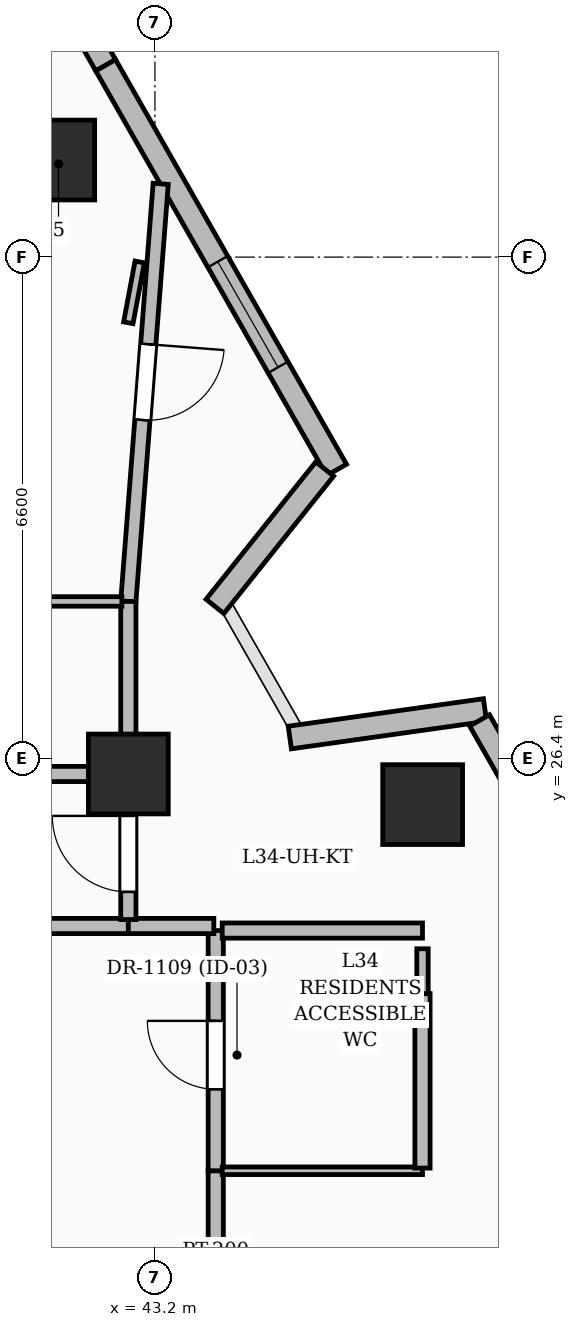
"""IFC4 building model, lengths in metres.
Left out: names, types, materials, properties, quantities, classifications, styles, units other than length and angle.
Written with IfcOpenShell. Run it as: python <this file> out.ifc"""

import sys

from ifc_helpers import new_model, si_unit, direction, frame, frame_2d, origin, origin_2d, place, context, subcontext, project, spatial, rectangle, extrude, element, fill, save


model = new_model("IFC4")
c1 = context("Model", 3, precision=1e-05, world=origin(), true_north=direction((0.0, 1.0)))
c2 = subcontext(c1, "Body", "Model", "MODEL_VIEW")
j1 = project(units=[si_unit("LENGTHUNIT", "METRE"), si_unit("PLANEANGLEUNIT", "RADIAN")], contexts=[c1])
p1 = place(None, origin())
s1 = spatial("IfcSite", under=j1, at=p1, CompositionType="ELEMENT")
p2 = place(p1, origin())
s2 = spatial("IfcBuilding", under=s1, at=p2, CompositionType="ELEMENT")
p3 = place(p2, frame((0.0, 0.0, 135.6)))
s3 = spatial("IfcBuildingStorey", under=s2, at=p3, CompositionType="ELEMENT", Elevation=135.6)
for number, where, z_axis, x_axis in (
    (1, (42.85, 26.2, 0.0), (0.0, 0.0, 1.0), (1.0, 0.0, 0.0)),
    (2, (46.722, 25.797, 0.0), (0.0, 0.0, 1.0), (1.0, 0.0, 0.0)),
    (3, (41.882, 34.277, 0.0), (0.0, 0.0, 1.0), (1.0, 0.0, 0.0)),
):
    element("IfcColumn", number, at=place(p3, frame(where, z_axis=z_axis, x_axis=x_axis)), inside=s3, PredefinedType="COLUMN", context=c2, shape_type="SweptSolid", body=[
        extrude(rectangle(XDim=1.05, YDim=1.05, at=origin_2d()), origin(), (0.0, 0.0, 1.0), 3.6),
    ])
p4 = place(p3, frame((39.799, 40.348, 0.0), z_axis=(0.0, 0.0, 1.0), x_axis=(0.495693940787, -0.868497275222, 0.0)))
e4 = element("IfcWall", 4, at=p4, inside=s3, PredefinedType="SOLIDWALL", context=c2, shape_type="SweptSolid", body=[
    extrude(rectangle(XDim=5.555, YDim=0.3, at=frame_2d((2.777, 0.0))), origin(), (0.0, 0.0, 1.0), 3.35),
])
p5 = place(p4, frame((2.175, 0.0, 0.6)))
e5 = element("IfcOpeningElement", 5, at=p5, cuts=e4, PredefinedType="OPENING", context=c2, shape_type="SweptSolid", body=[
    extrude(rectangle(XDim=1.8, YDim=2.1, at=frame_2d((0.9, 1.05))), frame((0.0, 0.16, 0.0), z_axis=(0.0, -1.0, 0.0), x_axis=(1.0, 0.0, 0.0)), (0.0, 0.0, 1.0), 0.32),
])
p6 = place(p3, frame((42.552, 35.524, 0.0), z_axis=(0.0, 0.0, 1.0), x_axis=(0.495688482465, -0.86850039053, 0.0)))
e6 = element("IfcWall", 6, at=p6, inside=s3, PredefinedType="SOLIDWALL", context=c2, shape_type="SweptSolid", body=[
    extrude(rectangle(XDim=6.129, YDim=0.3, at=frame_2d((3.065, 0.0))), origin(), (0.0, 0.0, 1.0), 3.35),
])
p7 = place(p6, frame((2.975, 0.0, 0.55)))
e7 = element("IfcOpeningElement", 7, at=p7, cuts=e6, PredefinedType="OPENING", context=c2, shape_type="SweptSolid", body=[
    extrude(rectangle(XDim=1.6, YDim=2.2, at=frame_2d((0.8, 1.1))), frame((0.0, 0.16, 0.0), z_axis=(0.0, -1.0, 0.0), x_axis=(1.0, 0.0, 0.0)), (0.0, 0.0, 1.0), 0.32),
])
p8 = place(p3, frame((45.434, 30.213, 0.0), z_axis=(0.0, 0.0, 1.0), x_axis=(-0.624064384905, -0.781372922165, 0.0)))
e8 = element("IfcWall", 8, at=p8, inside=s3, PredefinedType="SOLIDWALL", context=c2, shape_type="SweptSolid", body=[
    extrude(rectangle(XDim=2.314, YDim=0.3, at=frame_2d((1.157, 0.0))), origin(), (0.0, 0.0, 1.0), 2.575),
])
p9 = place(p3, frame((44.974, 26.679, 0.0), z_axis=(0.0, 0.0, 1.0), x_axis=(0.990207636063, 0.139602426493, 0.0)))
e9 = element("IfcWall", 9, at=p9, inside=s3, PredefinedType="SOLIDWALL", context=c2, shape_type="SweptSolid", body=[
    extrude(rectangle(XDim=2.594, YDim=0.3, at=frame_2d((1.297, 0.0))), origin(), (0.0, 0.0, 1.0), 2.575),
])
p10 = place(p3, frame((47.471, 26.905, 0.0), z_axis=(0.0, 0.0, 1.0), x_axis=(0.495678614701, -0.86850602239, 0.0)))
e10 = element("IfcWall", 10, at=p10, inside=s3, PredefinedType="SOLIDWALL", context=c2, shape_type="SweptSolid", body=[
    extrude(rectangle(XDim=6.055, YDim=0.3, at=frame_2d((3.028, 0.0))), origin(), (0.0, 0.0, 1.0), 3.35),
])
p11 = place(p10, frame((4.15, 0.0, 0.8)))
e11 = element("IfcOpeningElement", 11, at=p11, cuts=e10, PredefinedType="OPENING", context=c2, shape_type="SweptSolid", body=[
    extrude(rectangle(XDim=1.2, YDim=1.8, at=frame_2d((0.6, 0.9))), frame((0.0, 0.16, 0.0), z_axis=(0.0, -1.0, 0.0), x_axis=(1.0, 0.0, 0.0)), (0.0, 0.0, 1.0), 0.32),
])
p12 = place(p3, frame((44.0, 17.835, 0.0), z_axis=(0.0, 0.0, 1.0), x_axis=(0.0, 1.0, 0.0)))
e12 = element("IfcWall", 12, at=p12, inside=s3, PredefinedType="PARTITIONING", context=c2, shape_type="SweptSolid", body=[
    extrude(rectangle(XDim=3.145, YDim=0.2, at=frame_2d((1.573, 0.0))), origin(), (0.0, 0.0, 1.0), 3.35),
])
p13 = place(p3, frame((42.85, 24.2, 0.0), z_axis=(0.0, 0.0, 1.0), x_axis=(-1.0, 0.0, 0.0)))
e13 = element("IfcWall", 13, at=p13, inside=s3, PredefinedType="PARTITIONING", context=c2, shape_type="SweptSolid", body=[
    extrude(rectangle(XDim=1.4, YDim=0.2, at=frame_2d((0.7, 0.0))), origin(), (0.0, 0.0, 1.0), 3.35),
])
p14 = place(p3, frame((44.0, 20.98, 0.0), z_axis=(0.0, 0.0, 1.0), x_axis=(0.0, 1.0, 0.0)))
e14 = element("IfcWall", 14, at=p14, inside=s3, PredefinedType="PARTITIONING", context=c2, shape_type="SweptSolid", body=[
    extrude(rectangle(XDim=3.16, YDim=0.2, at=frame_2d((1.58, 0.0))), origin(), (0.0, 0.0, 1.0), 2.436),
])
p15 = place(p14, frame((1.072, 0.0, 0.0)))
e15 = element("IfcOpeningElement", 15, at=p15, cuts=e14, PredefinedType="OPENING", context=c2, shape_type="SweptSolid", body=[
    extrude(rectangle(XDim=0.9, YDim=2.1, at=frame_2d((0.45, 1.05))), frame((0.0, 0.11, 0.0), z_axis=(0.0, -1.0, 0.0), x_axis=(1.0, 0.0, 0.0)), (0.0, 0.0, 1.0), 0.22),
])
p16 = place(p3, frame((43.975, 24.2, 0.0), z_axis=(0.0, 0.0, 1.0), x_axis=(-1.0, 0.0, 0.0)))
e16 = element("IfcWall", 16, at=p16, inside=s3, PredefinedType="PARTITIONING", context=c2, shape_type="SweptSolid", body=[
    extrude(rectangle(XDim=1.125, YDim=0.2, at=frame_2d((0.562, 0.0))), origin(), (0.0, 0.0, 1.0), 2.436),
])
p17 = place(p3, frame((46.72, 20.98, 0.0), z_axis=(0.0, 0.0, 1.0), x_axis=(-1.0, 0.0, 0.0)))
e17 = element("IfcWall", 17, at=p17, inside=s3, PredefinedType="PARTITIONING", context=c2, shape_type="SweptSolid", body=[
    extrude(rectangle(XDim=2.635, YDim=0.1, at=frame_2d((1.317, 0.0))), origin(), (0.0, 0.0, 1.0), 2.372),
])
p18 = place(p3, frame((42.85, 24.285, 0.0), z_axis=(0.0, 0.0, 1.0), x_axis=(0.0, 1.0, 0.0)))
e18 = element("IfcWall", 18, at=p18, inside=s3, PredefinedType="PARTITIONING", context=c2, shape_type="SweptSolid", body=[
    extrude(rectangle(XDim=1.915, YDim=0.2, at=frame_2d((0.958, 0.0))), origin(), (0.0, 0.0, 1.0), 2.436),
])
p19 = place(p18, frame((0.364, 0.0, 0.0)))
e19 = element("IfcOpeningElement", 19, at=p19, cuts=e18, PredefinedType="OPENING", context=c2, shape_type="SweptSolid", body=[
    extrude(rectangle(XDim=1.0, YDim=2.2, at=frame_2d((0.5, 1.1))), frame((0.0, 0.11, 0.0), z_axis=(0.0, -1.0, 0.0), x_axis=(1.0, 0.0, 0.0)), (0.0, 0.0, 1.0), 0.22),
])
p20 = place(p3, frame((42.765, 26.2, 0.0), z_axis=(0.0, 0.0, 1.0), x_axis=(-1.0, 0.0, 0.0)))
e20 = element("IfcWall", 20, at=p20, inside=s3, PredefinedType="PARTITIONING", context=c2, shape_type="SweptSolid", body=[
    extrude(rectangle(XDim=4.027, YDim=0.2, at=frame_2d((2.014, 0.0))), origin(), (0.0, 0.0, 1.0), 2.436),
])
p21 = place(p20, frame((1.461, 0.0, 0.0)))
e21 = element("IfcOpeningElement", 21, at=p21, cuts=e20, PredefinedType="OPENING", context=c2, shape_type="SweptSolid", body=[
    extrude(rectangle(XDim=0.95, YDim=2.2, at=frame_2d((0.475, 1.1))), frame((0.0, 0.11, 0.0), z_axis=(0.0, -1.0, 0.0), x_axis=(1.0, 0.0, 0.0)), (0.0, 0.0, 1.0), 0.22),
])
p22 = place(p3, frame((44.085, 24.14, 0.0), z_axis=(0.0, 0.0, 1.0), x_axis=(1.0, 0.0, 0.0)))
e22 = element("IfcWall", 22, at=p22, inside=s3, PredefinedType="PARTITIONING", context=c2, shape_type="SweptSolid", body=[
    extrude(rectangle(XDim=2.635, YDim=0.2, at=frame_2d((1.317, 0.0))), origin(), (0.0, 0.0, 1.0), 2.372),
])
p23 = place(p3, frame((46.72, 21.015, 0.0), z_axis=(0.0, 0.0, 1.0), x_axis=(0.0, 1.0, 0.0)))
e23 = element("IfcWall", 23, at=p23, inside=s3, PredefinedType="PARTITIONING", context=c2, shape_type="SweptSolid", body=[
    extrude(rectangle(XDim=2.295, YDim=0.2, at=frame_2d((1.147, 0.0))), origin(), (0.0, 0.0, 1.0), 2.709),
])
p24 = place(p3, frame((43.276, 33.964, 0.0), z_axis=(0.0, 0.0, 1.0), x_axis=(-0.077265658671, -0.997010540561, 0.0)))
e24 = element("IfcWall", 24, at=p24, inside=s3, PredefinedType="PARTITIONING", context=c2, shape_type="SweptSolid", body=[
    extrude(rectangle(XDim=5.51, YDim=0.2, at=frame_2d((2.755, 0.0))), origin(), (0.0, 0.0, 1.0), 2.372),
])
p25 = place(p24, frame((2.116, 0.0, 0.0)))
e25 = element("IfcOpeningElement", 25, at=p25, cuts=e24, PredefinedType="OPENING", context=c2, shape_type="SweptSolid", body=[
    extrude(rectangle(XDim=1.0, YDim=2.2, at=frame_2d((0.5, 1.1))), frame((0.0, 0.11, 0.0), z_axis=(0.0, -1.0, 0.0), x_axis=(1.0, 0.0, 0.0)), (0.0, 0.0, 1.0), 0.22),
])
p26 = place(p3, frame((42.85, 28.47, 0.0), z_axis=(0.0, 0.0, 1.0), x_axis=(0.0, -1.0, 0.0)))
e26 = element("IfcWall", 26, at=p26, inside=s3, PredefinedType="PARTITIONING", context=c2, shape_type="SweptSolid", body=[
    extrude(rectangle(XDim=2.27, YDim=0.2, at=frame_2d((1.135, 0.0))), origin(), (0.0, 0.0, 1.0), 2.372),
])
p27 = place(p3, frame((38.34, 28.47, 0.0), z_axis=(0.0, 0.0, 1.0), x_axis=(1.0, 0.0, 0.0)))
e27 = element("IfcWall", 27, at=p27, inside=s3, PredefinedType="PARTITIONING", context=c2, shape_type="SweptSolid", body=[
    extrude(rectangle(XDim=4.425, YDim=0.125, at=frame_2d((2.212, 0.0))), origin(), (0.0, 0.0, 1.0), 2.372),
])
p28 = place(p27, frame((1.78, 0.0, 0.0)))
e28 = element("IfcOpeningElement", 28, at=p28, cuts=e27, PredefinedType="OPENING", context=c2, shape_type="SweptSolid", body=[
    extrude(rectangle(XDim=0.95, YDim=2.2, at=frame_2d((0.475, 1.1))), frame((0.0, 0.072, 0.0), z_axis=(0.0, -1.0, 0.0), x_axis=(1.0, 0.0, 0.0)), (0.0, 0.0, 1.0), 0.145),
])
p29 = place(p3, frame((43.0, 32.936, 0.0), z_axis=(0.0, 0.0, 1.0), x_axis=(-0.184161767382, -0.98289594741, 0.0)))
e29 = element("IfcWall", 29, at=p29, inside=s3, PredefinedType="PARTITIONING", context=c2, shape_type="SweptSolid", body=[
    extrude(rectangle(XDim=0.814, YDim=0.125, at=frame_2d((0.407, 0.0))), origin(), (0.0, 0.0, 1.0), 2.57),
])
p30 = place(p3, frame((46.72, 23.31, 0.0), z_axis=(0.0, 0.0, 1.0), x_axis=(0.0, 1.0, 0.0)))
e30 = element("IfcWall", 30, at=p30, inside=s3, PredefinedType="PARTITIONING", context=c2, shape_type="SweptSolid", body=[
    extrude(rectangle(XDim=0.59, YDim=0.15, at=frame_2d((0.295, 0.0))), origin(), (0.0, 0.0, 1.0), 3.35),
])
p31 = place(p7, origin())
e31 = element("IfcWindow", 31, at=p31, inside=s3, PartitioningType="SINGLE_PANEL", PredefinedType="WINDOW", context=c2, shape_type="SweptSolid", body=[
    extrude(rectangle(XDim=1.6, YDim=2.2, at=frame_2d((0.8, 1.1))), frame((0.0, 0.03, 0.0), z_axis=(0.0, -1.0, 0.0), x_axis=(1.0, 0.0, 0.0)), (0.0, 0.0, 1.0), 0.06),
])
fill(e7, e31)
p32 = place(p15, origin())
e32 = element("IfcDoor", 32, at=p32, inside=s3, OperationType="SINGLE_SWING_RIGHT", PredefinedType="DOOR", context=c2, shape_type="SweptSolid", body=[
    extrude(rectangle(XDim=0.9, YDim=2.1, at=frame_2d((0.45, 1.05))), frame((0.0, 0.025, 0.0), z_axis=(0.0, -1.0, 0.0), x_axis=(1.0, 0.0, 0.0)), (0.0, 0.0, 1.0), 0.05),
])
fill(e15, e32)
p33 = place(p19, origin())
e33 = element("IfcDoor", 33, at=p33, inside=s3, OperationType="SINGLE_SWING_RIGHT", PredefinedType="DOOR", context=c2, shape_type="SweptSolid", body=[
    extrude(rectangle(XDim=1.0, YDim=2.2, at=frame_2d((0.5, 1.1))), frame((0.0, 0.025, 0.0), z_axis=(0.0, -1.0, 0.0), x_axis=(1.0, 0.0, 0.0)), (0.0, 0.0, 1.0), 0.05),
])
fill(e19, e33)
p34 = place(p25, origin())
e34 = element("IfcDoor", 34, at=p34, inside=s3, OperationType="SINGLE_SWING_LEFT", PredefinedType="DOOR", context=c2, shape_type="SweptSolid", body=[
    extrude(rectangle(XDim=1.0, YDim=2.2, at=frame_2d((0.5, 1.1))), frame((0.0, 0.025, 0.0), z_axis=(0.0, -1.0, 0.0), x_axis=(1.0, 0.0, 0.0)), (0.0, 0.0, 1.0), 0.05),
])
fill(e25, e34)
save(model, sys.argv[1])
